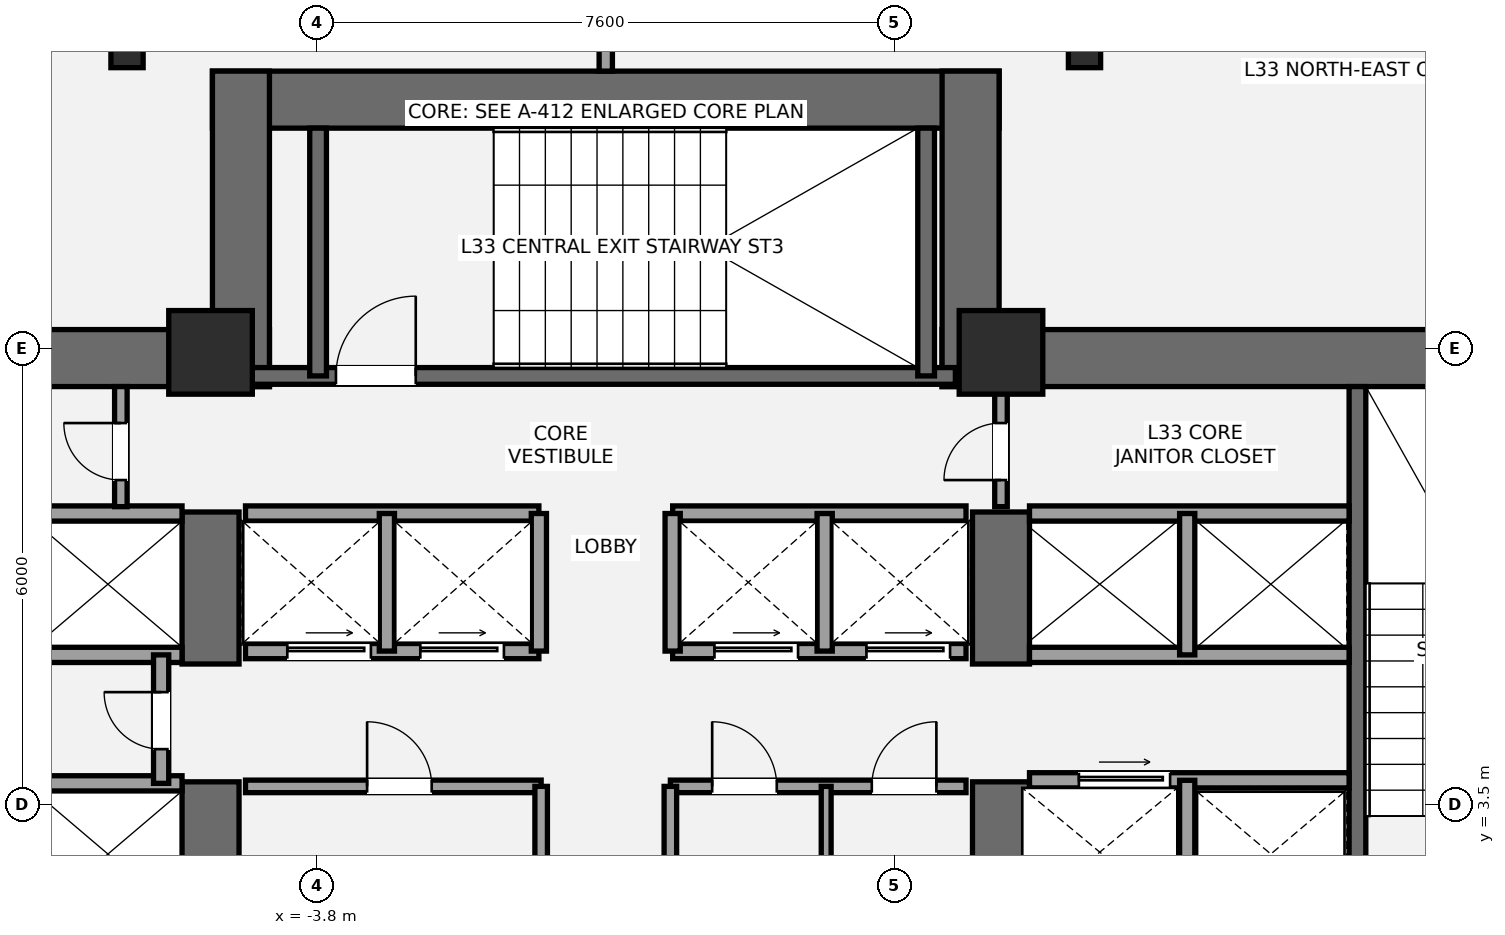
"""IFC4 building model, lengths in metres.
Left out: names, types, materials, properties, quantities, classifications, styles, units other than length and angle.
Written with IfcOpenShell. Run it as: python <this file> out.ifc"""

import sys

from ifc_helpers import new_model, si_unit, direction, frame, frame_2d, origin, origin_2d, place, context, subcontext, project, spatial, rectangle, i_section, extrude, element, fill, save


model = new_model("IFC4")
c1 = context("Model", 3, precision=1e-05, world=origin(), true_north=direction((0.0, 1.0)))
c2 = subcontext(c1, "Body", "Model", "MODEL_VIEW")
j1 = project(units=[si_unit("LENGTHUNIT", "METRE"), si_unit("PLANEANGLEUNIT", "RADIAN")], contexts=[c1])
p1 = place(None, origin())
s1 = spatial("IfcSite", under=j1, at=p1, CompositionType="ELEMENT")
p2 = place(p1, origin())
s2 = spatial("IfcBuilding", under=s1, at=p2, CompositionType="ELEMENT")
p3 = place(p2, frame((0.0, 0.0, 124.6)))
s3 = spatial("IfcBuildingStorey", under=s2, at=p3, CompositionType="ELEMENT", Elevation=124.6)
p4 = place(p3, frame((-13.9, 9.375, 0.0), z_axis=(0.0, 0.0, 1.0), x_axis=(1.0, 0.0, 0.0)))
e1 = element("IfcWall", 1, at=p4, inside=s3, PredefinedType="SHEAR", context=c2, shape_type="SweptSolid", body=[
    extrude(rectangle(XDim=9.475, YDim=0.75, at=frame_2d((4.737, 0.0))), origin(), (0.0, 0.0, 1.0), 3.5),
])
p5 = place(p3, frame((-5.2, 1.1, 0.0), z_axis=(0.0, 0.0, 1.0), x_axis=(0.0, 1.0, 0.0)))
e2 = element("IfcWall", 2, at=p5, inside=s3, PredefinedType="SHEAR", context=c2, shape_type="SweptSolid", body=[
    extrude(rectangle(XDim=2.7, YDim=0.75, at=frame_2d((1.35, 0.0))), origin(), (0.0, 0.0, 1.0), 3.5),
])
p6 = place(p3, frame((-5.2, 5.35, 0.0), z_axis=(0.0, 0.0, 1.0), x_axis=(0.0, 1.0, 0.0)))
e3 = element("IfcWall", 3, at=p6, inside=s3, PredefinedType="SHEAR", context=c2, shape_type="SweptSolid", body=[
    extrude(rectangle(XDim=2.0, YDim=0.75, at=frame_2d((1.0, 0.0))), origin(), (0.0, 0.0, 1.0), 3.5),
])
p7 = place(p3, frame((4.425, 9.375, 0.0), z_axis=(0.0, 0.0, 1.0), x_axis=(1.0, 0.0, 0.0)))
e4 = element("IfcWall", 4, at=p7, inside=s3, PredefinedType="SHEAR", context=c2, shape_type="SweptSolid", body=[
    extrude(rectangle(XDim=9.475, YDim=0.75, at=frame_2d((4.737, 0.0))), origin(), (0.0, 0.0, 1.0), 3.5),
])
p8 = place(p3, frame((5.2, 1.1, 0.0), z_axis=(0.0, 0.0, 1.0), x_axis=(0.0, 1.0, 0.0)))
e5 = element("IfcWall", 5, at=p8, inside=s3, PredefinedType="SHEAR", context=c2, shape_type="SweptSolid", body=[
    extrude(rectangle(XDim=2.7, YDim=0.75, at=frame_2d((1.35, 0.0))), origin(), (0.0, 0.0, 1.0), 3.5),
])
p9 = place(p3, frame((5.2, 5.35, 0.0), z_axis=(0.0, 0.0, 1.0), x_axis=(0.0, 1.0, 0.0)))
e6 = element("IfcWall", 6, at=p9, inside=s3, PredefinedType="SHEAR", context=c2, shape_type="SweptSolid", body=[
    extrude(rectangle(XDim=2.0, YDim=0.75, at=frame_2d((1.0, 0.0))), origin(), (0.0, 0.0, 1.0), 3.5),
])
p10 = place(p3, frame((9.89, 1.85, 0.0), z_axis=(0.0, 0.0, 1.0), x_axis=(0.0, 1.0, 0.0)))
e7 = element("IfcWall", 7, at=p10, inside=s3, PredefinedType="SHEAR", context=c2, shape_type="SweptSolid", body=[
    extrude(rectangle(XDim=7.15, YDim=0.22, at=frame_2d((3.575, 0.0))), origin(), (0.0, 0.0, 1.0), 3.5),
])
p11 = place(p3, frame((-5.175, 12.775, 0.0), z_axis=(0.0, 0.0, 1.0), x_axis=(1.0, 0.0, 0.0)))
e8 = element("IfcWall", 8, at=p11, inside=s3, PredefinedType="SHEAR", context=c2, shape_type="SweptSolid", body=[
    extrude(rectangle(XDim=10.35, YDim=0.75, at=frame_2d((5.175, 0.0))), origin(), (0.0, 0.0, 1.0), 3.5),
])
for number, where, z_axis, x_axis in (
    (9, (-4.8, 9.0, 0.0), (0.0, 0.0, 1.0), (0.0, 1.0, 0.0)),
    (10, (4.8, 9.0, 0.0), (0.0, 0.0, 1.0), (0.0, 1.0, 0.0)),
):
    element("IfcWall", number, at=place(p3, frame(where, z_axis=z_axis, x_axis=x_axis)), inside=s3, PredefinedType="SHEAR", context=c2, shape_type="SweptSolid", body=[
        extrude(rectangle(XDim=4.15, YDim=0.75, at=frame_2d((2.075, 0.0))), origin(), (0.0, 0.0, 1.0), 3.5),
    ])
p12 = place(p3, frame((-4.7, 9.14, 0.0), z_axis=(0.0, 0.0, 1.0), x_axis=(1.0, 0.0, 0.0)))
e11 = element("IfcWall", 11, at=p12, inside=s3, PredefinedType="SHEAR", context=c2, shape_type="SweptSolid", body=[
    extrude(rectangle(XDim=9.3, YDim=0.22, at=frame_2d((4.65, 0.0))), origin(), (0.0, 0.0, 1.0), 3.5),
])
p13 = place(p12, frame((1.15, 0.0, 0.0)))
e12 = element("IfcOpeningElement", 12, at=p13, cuts=e11, PredefinedType="OPENING", context=c2, shape_type="SweptSolid", body=[
    extrude(rectangle(XDim=1.05, YDim=2.15, at=frame_2d((0.525, 1.075))), frame((0.0, 0.12, 0.0), z_axis=(0.0, -1.0, 0.0), x_axis=(1.0, 0.0, 0.0)), (0.0, 0.0, 1.0), 0.24),
])
for number, where, z_axis, x_axis in (
    (13, (-3.785, 9.14, 0.0), (0.0, 0.0, 1.0), (0.0, 1.0, 0.0)),
    (14, (4.215, 9.14, 0.0), (0.0, 0.0, 1.0), (0.0, 1.0, 0.0)),
):
    element("IfcWall", number, at=place(p3, frame(where, z_axis=z_axis, x_axis=x_axis)), inside=s3, PredefinedType="SHEAR", context=c2, shape_type="SweptSolid", body=[
        extrude(rectangle(XDim=3.26, YDim=0.22, at=frame_2d((1.63, 0.0))), origin(), (0.0, 0.0, 1.0), 3.5),
    ])
for number, where, z_axis, x_axis in (
    (15, (-5.2, 9.45, 0.0), (0.0, 0.0, 1.0), (1.0, 0.0, 0.0)),
    (16, (5.2, 9.45, 0.0), (0.0, 0.0, 1.0), (1.0, 0.0, 0.0)),
):
    element("IfcColumn", number, at=place(p3, frame(where, z_axis=z_axis, x_axis=x_axis)), inside=s3, PredefinedType="COLUMN", context=c2, shape_type="SweptSolid", body=[
        extrude(rectangle(XDim=1.1, YDim=1.1, at=origin_2d()), origin(), (0.0, 0.0, 1.0), 3.5),
    ])
for number, where, z_axis, x_axis in (
    (17, (6.299, 13.433, 0.0), (0.0, 0.0, 1.0), (1.0, 0.0, 0.0)),
    (18, (-6.299, 13.433, 0.0), (0.0, 0.0, 1.0), (1.0, 0.0, 0.0)),
):
    element("IfcColumn", number, at=place(p3, frame(where, z_axis=z_axis, x_axis=x_axis)), inside=s3, PredefinedType="COLUMN", context=c2, shape_type="SweptSolid", body=[
        extrude(i_section(OverallWidth=0.424, OverallDepth=0.474, WebThickness=0.048, FlangeThickness=0.077, at=origin_2d()), origin(), (0.0, 0.0, 1.0), 3.5),
    ])
for number, where, z_axis, x_axis in (
    (19, (-9.78, 3.78, 0.0), (0.0, 0.0, 1.0), (1.0, 0.0, 0.0)),
    (20, (-9.78, 5.47, 0.0), (0.0, 0.0, 1.0), (1.0, 0.0, 0.0)),
    (21, (-9.78, 7.33, 0.0), (0.0, 0.0, 1.0), (1.0, 0.0, 0.0)),
):
    element("IfcWall", number, at=place(p3, frame(where, z_axis=z_axis, x_axis=x_axis)), inside=s3, PredefinedType="SOLIDWALL", context=c2, shape_type="SweptSolid", body=[
        extrude(rectangle(XDim=4.205, YDim=0.2, at=frame_2d((2.103, 0.0))), origin(), (0.0, 0.0, 1.0), 3.31),
    ])
p14 = place(p3, frame((-5.85, 3.78, 0.0), z_axis=(0.0, 0.0, 1.0), x_axis=(0.0, 1.0, 0.0)))
e22 = element("IfcWall", 22, at=p14, inside=s3, PredefinedType="SOLIDWALL", context=c2, shape_type="SweptSolid", body=[
    extrude(rectangle(XDim=1.69, YDim=0.2, at=frame_2d((0.845, 0.0))), origin(), (0.0, 0.0, 1.0), 3.31),
])
p15 = place(p14, frame((0.45, 0.0, 0.0)))
e23 = element("IfcOpeningElement", 23, at=p15, cuts=e22, PredefinedType="OPENING", context=c2, shape_type="SweptSolid", body=[
    extrude(rectangle(XDim=0.75, YDim=2.1, at=frame_2d((0.375, 1.05))), frame((0.0, 0.11, 0.0), z_axis=(0.0, -1.0, 0.0), x_axis=(1.0, 0.0, 0.0)), (0.0, 0.0, 1.0), 0.22),
])
p16 = place(p3, frame((5.575, 3.82, 0.0), z_axis=(0.0, 0.0, 1.0), x_axis=(1.0, 0.0, 0.0)))
e24 = element("IfcWall", 24, at=p16, inside=s3, PredefinedType="SOLIDWALL", context=c2, shape_type="SweptSolid", body=[
    extrude(rectangle(XDim=4.205, YDim=0.2, at=frame_2d((2.103, 0.0))), origin(), (0.0, 0.0, 1.0), 3.31),
])
p17 = place(p16, frame((0.65, 0.0, 0.0)))
e25 = element("IfcOpeningElement", 25, at=p17, cuts=e24, PredefinedType="OPENING", context=c2, shape_type="SweptSolid", body=[
    extrude(rectangle(XDim=1.2, YDim=2.2, at=frame_2d((0.6, 1.1))), frame((0.0, 0.11, 0.0), z_axis=(0.0, -1.0, 0.0), x_axis=(1.0, 0.0, 0.0)), (0.0, 0.0, 1.0), 0.22),
])
p18 = place(p3, frame((7.65, 1.85, 0.0), z_axis=(0.0, 0.0, 1.0), x_axis=(0.0, 1.0, 0.0)))
e26 = element("IfcWall", 26, at=p18, inside=s3, PredefinedType="SOLIDWALL", context=c2, shape_type="SweptSolid", body=[
    extrude(rectangle(XDim=1.97, YDim=0.2, at=frame_2d((0.985, 0.0))), origin(), (0.0, 0.0, 1.0), 3.31),
])
for number, where, z_axis, x_axis in (
    (27, (5.575, 5.47, 0.0), (0.0, 0.0, 1.0), (1.0, 0.0, 0.0)),
    (28, (5.575, 7.33, 0.0), (0.0, 0.0, 1.0), (1.0, 0.0, 0.0)),
):
    element("IfcWall", number, at=place(p3, frame(where, z_axis=z_axis, x_axis=x_axis)), inside=s3, PredefinedType="SOLIDWALL", context=c2, shape_type="SweptSolid", body=[
        extrude(rectangle(XDim=4.205, YDim=0.2, at=frame_2d((2.103, 0.0))), origin(), (0.0, 0.0, 1.0), 3.31),
    ])
p19 = place(p3, frame((7.65, 5.47, 0.0), z_axis=(0.0, 0.0, 1.0), x_axis=(0.0, 1.0, 0.0)))
e29 = element("IfcWall", 29, at=p19, inside=s3, PredefinedType="SOLIDWALL", context=c2, shape_type="SweptSolid", body=[
    extrude(rectangle(XDim=1.86, YDim=0.2, at=frame_2d((0.93, 0.0))), origin(), (0.0, 0.0, 1.0), 3.31),
])
p20 = place(p3, frame((-4.74, 3.74, 0.0), z_axis=(0.0, 0.0, 1.0), x_axis=(1.0, 0.0, 0.0)))
e30 = element("IfcWall", 30, at=p20, inside=s3, PredefinedType="PARTITIONING", context=c2, shape_type="SweptSolid", body=[
    extrude(rectangle(XDim=3.89, YDim=0.165, at=frame_2d((1.945, 0.0))), origin(), (0.0, 0.0, 1.0), 3.31),
])
p21 = place(p20, frame((1.6, 0.0, 0.0)))
e31 = element("IfcOpeningElement", 31, at=p21, cuts=e30, PredefinedType="OPENING", context=c2, shape_type="SweptSolid", body=[
    extrude(rectangle(XDim=0.85, YDim=2.1, at=frame_2d((0.425, 1.05))), frame((0.0, 0.093, 0.0), z_axis=(0.0, -1.0, 0.0), x_axis=(1.0, 0.0, 0.0)), (0.0, 0.0, 1.0), 0.185),
])
p22 = place(p3, frame((-0.85, 1.92, 0.0), z_axis=(0.0, 0.0, 1.0), x_axis=(0.0, 1.0, 0.0)))
e32 = element("IfcWall", 32, at=p22, inside=s3, PredefinedType="PARTITIONING", context=c2, shape_type="SweptSolid", body=[
    extrude(rectangle(XDim=1.82, YDim=0.165, at=frame_2d((0.91, 0.0))), origin(), (0.0, 0.0, 1.0), 3.31),
])
p23 = place(p3, frame((0.85, 3.74, 0.0), z_axis=(0.0, 0.0, 1.0), x_axis=(1.0, 0.0, 0.0)))
e33 = element("IfcWall", 33, at=p23, inside=s3, PredefinedType="PARTITIONING", context=c2, shape_type="SweptSolid", body=[
    extrude(rectangle(XDim=3.89, YDim=0.165, at=frame_2d((1.945, 0.0))), origin(), (0.0, 0.0, 1.0), 3.31),
])
p24 = place(p23, frame((0.55, 0.0, 0.0)))
e34 = element("IfcOpeningElement", 34, at=p24, cuts=e33, PredefinedType="OPENING", context=c2, shape_type="SweptSolid", body=[
    extrude(rectangle(XDim=0.85, YDim=2.1, at=frame_2d((0.425, 1.05))), frame((0.0, 0.093, 0.0), z_axis=(0.0, -1.0, 0.0), x_axis=(1.0, 0.0, 0.0)), (0.0, 0.0, 1.0), 0.185),
])
p25 = place(p23, frame((2.65, 0.0, 0.0)))
e35 = element("IfcOpeningElement", 35, at=p25, cuts=e33, PredefinedType="OPENING", context=c2, shape_type="SweptSolid", body=[
    extrude(rectangle(XDim=0.85, YDim=2.1, at=frame_2d((0.425, 1.05))), frame((0.0, 0.093, 0.0), z_axis=(0.0, -1.0, 0.0), x_axis=(1.0, 0.0, 0.0)), (0.0, 0.0, 1.0), 0.185),
])
p26 = place(p3, frame((0.85, 1.92, 0.0), z_axis=(0.0, 0.0, 1.0), x_axis=(0.0, 1.0, 0.0)))
e36 = element("IfcWall", 36, at=p26, inside=s3, PredefinedType="PARTITIONING", context=c2, shape_type="SweptSolid", body=[
    extrude(rectangle(XDim=1.82, YDim=0.165, at=frame_2d((0.91, 0.0))), origin(), (0.0, 0.0, 1.0), 3.31),
])
p27 = place(p3, frame((2.9, 1.92, 0.0), z_axis=(0.0, 0.0, 1.0), x_axis=(0.0, 1.0, 0.0)))
e37 = element("IfcWall", 37, at=p27, inside=s3, PredefinedType="PARTITIONING", context=c2, shape_type="SweptSolid", body=[
    extrude(rectangle(XDim=1.82, YDim=0.13, at=frame_2d((0.91, 0.0))), origin(), (0.0, 0.0, 1.0), 3.31),
])
p28 = place(p3, frame((-4.74, 5.52, 0.0), z_axis=(0.0, 0.0, 1.0), x_axis=(1.0, 0.0, 0.0)))
e38 = element("IfcWall", 38, at=p28, inside=s3, PredefinedType="SOLIDWALL", context=c2, shape_type="SweptSolid", body=[
    extrude(rectangle(XDim=3.86, YDim=0.2, at=frame_2d((1.93, 0.0))), origin(), (0.0, 0.0, 1.0), 3.31),
])
p29 = place(p28, frame((0.55, 0.0, 0.0)))
e39 = element("IfcOpeningElement", 39, at=p29, cuts=e38, PredefinedType="OPENING", context=c2, shape_type="SweptSolid", body=[
    extrude(rectangle(XDim=1.1, YDim=2.2, at=frame_2d((0.55, 1.1))), frame((0.0, 0.11, 0.0), z_axis=(0.0, -1.0, 0.0), x_axis=(1.0, 0.0, 0.0)), (0.0, 0.0, 1.0), 0.22),
])
p30 = place(p28, frame((2.3, 0.0, 0.0)))
e40 = element("IfcOpeningElement", 40, at=p30, cuts=e38, PredefinedType="OPENING", context=c2, shape_type="SweptSolid", body=[
    extrude(rectangle(XDim=1.1, YDim=2.2, at=frame_2d((0.55, 1.1))), frame((0.0, 0.11, 0.0), z_axis=(0.0, -1.0, 0.0), x_axis=(1.0, 0.0, 0.0)), (0.0, 0.0, 1.0), 0.22),
])
p31 = place(p3, frame((0.88, 5.52, 0.0), z_axis=(0.0, 0.0, 1.0), x_axis=(1.0, 0.0, 0.0)))
e41 = element("IfcWall", 41, at=p31, inside=s3, PredefinedType="SOLIDWALL", context=c2, shape_type="SweptSolid", body=[
    extrude(rectangle(XDim=3.86, YDim=0.2, at=frame_2d((1.93, 0.0))), origin(), (0.0, 0.0, 1.0), 3.31),
])
p32 = place(p31, frame((0.55, 0.0, 0.0)))
e42 = element("IfcOpeningElement", 42, at=p32, cuts=e41, PredefinedType="OPENING", context=c2, shape_type="SweptSolid", body=[
    extrude(rectangle(XDim=1.1, YDim=2.2, at=frame_2d((0.55, 1.1))), frame((0.0, 0.11, 0.0), z_axis=(0.0, -1.0, 0.0), x_axis=(1.0, 0.0, 0.0)), (0.0, 0.0, 1.0), 0.22),
])
p33 = place(p31, frame((2.55, 0.0, 0.0)))
e43 = element("IfcOpeningElement", 43, at=p33, cuts=e41, PredefinedType="OPENING", context=c2, shape_type="SweptSolid", body=[
    extrude(rectangle(XDim=1.1, YDim=2.2, at=frame_2d((0.55, 1.1))), frame((0.0, 0.11, 0.0), z_axis=(0.0, -1.0, 0.0), x_axis=(1.0, 0.0, 0.0)), (0.0, 0.0, 1.0), 0.22),
])
for number, where, z_axis, x_axis in (
    (44, (-4.74, 7.33, 0.0), (0.0, 0.0, 1.0), (1.0, 0.0, 0.0)),
    (45, (0.88, 7.33, 0.0), (0.0, 0.0, 1.0), (1.0, 0.0, 0.0)),
):
    element("IfcWall", number, at=place(p3, frame(where, z_axis=z_axis, x_axis=x_axis)), inside=s3, PredefinedType="SOLIDWALL", context=c2, shape_type="SweptSolid", body=[
        extrude(rectangle(XDim=3.86, YDim=0.2, at=frame_2d((1.93, 0.0))), origin(), (0.0, 0.0, 1.0), 3.31),
    ])
for number, where, z_axis, x_axis in (
    (46, (-2.88, 5.52, 0.0), (0.0, 0.0, 1.0), (0.0, 1.0, 0.0)),
    (47, (2.88, 5.52, 0.0), (0.0, 0.0, 1.0), (0.0, 1.0, 0.0)),
    (48, (-0.88, 5.52, 0.0), (0.0, 0.0, 1.0), (0.0, 1.0, 0.0)),
    (49, (0.88, 5.52, 0.0), (0.0, 0.0, 1.0), (0.0, 1.0, 0.0)),
):
    element("IfcWall", number, at=place(p3, frame(where, z_axis=z_axis, x_axis=x_axis)), inside=s3, PredefinedType="SOLIDWALL", context=c2, shape_type="SweptSolid", body=[
        extrude(rectangle(XDim=1.81, YDim=0.2, at=frame_2d((0.905, 0.0))), origin(), (0.0, 0.0, 1.0), 3.31),
    ])
p34 = place(p3, frame((-6.38, 7.42, 0.0), z_axis=(0.0, 0.0, 1.0), x_axis=(0.0, 1.0, 0.0)))
e50 = element("IfcWall", 50, at=p34, inside=s3, PredefinedType="PARTITIONING", context=c2, shape_type="SweptSolid", body=[
    extrude(rectangle(XDim=1.58, YDim=0.165, at=frame_2d((0.79, 0.0))), origin(), (0.0, 0.0, 1.0), 3.31),
])
p35 = place(p34, frame((0.35, 0.0, 0.0)))
e51 = element("IfcOpeningElement", 51, at=p35, cuts=e50, PredefinedType="OPENING", context=c2, shape_type="SweptSolid", body=[
    extrude(rectangle(XDim=0.75, YDim=2.1, at=frame_2d((0.375, 1.05))), frame((0.0, 0.093, 0.0), z_axis=(0.0, -1.0, 0.0), x_axis=(1.0, 0.0, 0.0)), (0.0, 0.0, 1.0), 0.185),
])
p36 = place(p3, frame((5.2, 7.42, 0.0), z_axis=(0.0, 0.0, 1.0), x_axis=(0.0, 1.0, 0.0)))
e52 = element("IfcWall", 52, at=p36, inside=s3, PredefinedType="PARTITIONING", context=c2, shape_type="SweptSolid", body=[
    extrude(rectangle(XDim=1.58, YDim=0.165, at=frame_2d((0.79, 0.0))), origin(), (0.0, 0.0, 1.0), 3.31),
])
p37 = place(p36, frame((0.35, 0.0, 0.0)))
e53 = element("IfcOpeningElement", 53, at=p37, cuts=e52, PredefinedType="OPENING", context=c2, shape_type="SweptSolid", body=[
    extrude(rectangle(XDim=0.75, YDim=2.1, at=frame_2d((0.375, 1.05))), frame((0.0, 0.093, 0.0), z_axis=(0.0, -1.0, 0.0), x_axis=(1.0, 0.0, 0.0)), (0.0, 0.0, 1.0), 0.185),
])
p38 = place(p3, frame((0.0, 13.15, 0.0), z_axis=(0.0, 0.0, 1.0), x_axis=(0.0, 1.0, 0.0)))
e54 = element("IfcWall", 54, at=p38, inside=s3, PredefinedType="PARTITIONING", context=c2, shape_type="SweptSolid", body=[
    extrude(rectangle(XDim=3.979, YDim=0.175, at=frame_2d((1.99, 0.0))), origin(), (0.0, 0.0, 1.0), 3.31),
])
p39 = place(p13, origin())
e55 = element("IfcDoor", 55, at=p39, inside=s3, OperationType="SINGLE_SWING_RIGHT", PredefinedType="DOOR", context=c2, shape_type="SweptSolid", body=[
    extrude(rectangle(XDim=1.05, YDim=2.15, at=frame_2d((0.525, 1.075))), frame((0.0, 0.025, 0.0), z_axis=(0.0, -1.0, 0.0), x_axis=(1.0, 0.0, 0.0)), (0.0, 0.0, 1.0), 0.05),
])
fill(e12, e55)
p40 = place(p15, origin())
e56 = element("IfcDoor", 56, at=p40, inside=s3, OperationType="SINGLE_SWING_RIGHT", PredefinedType="DOOR", context=c2, shape_type="SweptSolid", body=[
    extrude(rectangle(XDim=0.75, YDim=2.1, at=frame_2d((0.375, 1.05))), frame((0.0, 0.025, 0.0), z_axis=(0.0, -1.0, 0.0), x_axis=(1.0, 0.0, 0.0)), (0.0, 0.0, 1.0), 0.05),
])
fill(e23, e56)
p41 = place(p17, origin())
e57 = element("IfcDoor", 57, at=p41, inside=s3, OperationType="SLIDING_TO_RIGHT", PredefinedType="DOOR", context=c2, shape_type="SweptSolid", body=[
    extrude(rectangle(XDim=1.2, YDim=2.2, at=frame_2d((0.6, 1.1))), frame((0.0, 0.025, 0.0), z_axis=(0.0, -1.0, 0.0), x_axis=(1.0, 0.0, 0.0)), (0.0, 0.0, 1.0), 0.05),
])
fill(e25, e57)
p42 = place(p21, origin())
e58 = element("IfcDoor", 58, at=p42, inside=s3, OperationType="SINGLE_SWING_LEFT", PredefinedType="DOOR", context=c2, shape_type="SweptSolid", body=[
    extrude(rectangle(XDim=0.85, YDim=2.1, at=frame_2d((0.425, 1.05))), frame((0.0, 0.025, 0.0), z_axis=(0.0, -1.0, 0.0), x_axis=(1.0, 0.0, 0.0)), (0.0, 0.0, 1.0), 0.05),
])
fill(e31, e58)
p43 = place(p24, origin())
e59 = element("IfcDoor", 59, at=p43, inside=s3, OperationType="SINGLE_SWING_LEFT", PredefinedType="DOOR", context=c2, shape_type="SweptSolid", body=[
    extrude(rectangle(XDim=0.85, YDim=2.1, at=frame_2d((0.425, 1.05))), frame((0.0, 0.025, 0.0), z_axis=(0.0, -1.0, 0.0), x_axis=(1.0, 0.0, 0.0)), (0.0, 0.0, 1.0), 0.05),
])
fill(e34, e59)
p44 = place(p25, origin())
e60 = element("IfcDoor", 60, at=p44, inside=s3, OperationType="SINGLE_SWING_RIGHT", PredefinedType="DOOR", context=c2, shape_type="SweptSolid", body=[
    extrude(rectangle(XDim=0.85, YDim=2.1, at=frame_2d((0.425, 1.05))), frame((0.0, 0.025, 0.0), z_axis=(0.0, -1.0, 0.0), x_axis=(1.0, 0.0, 0.0)), (0.0, 0.0, 1.0), 0.05),
])
fill(e35, e60)
p45 = place(p29, origin())
e61 = element("IfcDoor", 61, at=p45, inside=s3, OperationType="SLIDING_TO_LEFT", PredefinedType="DOOR", context=c2, shape_type="SweptSolid", body=[
    extrude(rectangle(XDim=1.1, YDim=2.2, at=frame_2d((0.55, 1.1))), frame((0.0, 0.025, 0.0), z_axis=(0.0, -1.0, 0.0), x_axis=(1.0, 0.0, 0.0)), (0.0, 0.0, 1.0), 0.05),
])
fill(e39, e61)
p46 = place(p30, origin())
e62 = element("IfcDoor", 62, at=p46, inside=s3, OperationType="SLIDING_TO_LEFT", PredefinedType="DOOR", context=c2, shape_type="SweptSolid", body=[
    extrude(rectangle(XDim=1.1, YDim=2.2, at=frame_2d((0.55, 1.1))), frame((0.0, 0.025, 0.0), z_axis=(0.0, -1.0, 0.0), x_axis=(1.0, 0.0, 0.0)), (0.0, 0.0, 1.0), 0.05),
])
fill(e40, e62)
p47 = place(p32, origin())
e63 = element("IfcDoor", 63, at=p47, inside=s3, OperationType="SLIDING_TO_LEFT", PredefinedType="DOOR", context=c2, shape_type="SweptSolid", body=[
    extrude(rectangle(XDim=1.1, YDim=2.2, at=frame_2d((0.55, 1.1))), frame((0.0, 0.025, 0.0), z_axis=(0.0, -1.0, 0.0), x_axis=(1.0, 0.0, 0.0)), (0.0, 0.0, 1.0), 0.05),
])
fill(e42, e63)
p48 = place(p33, origin())
e64 = element("IfcDoor", 64, at=p48, inside=s3, OperationType="SLIDING_TO_LEFT", PredefinedType="DOOR", context=c2, shape_type="SweptSolid", body=[
    extrude(rectangle(XDim=1.1, YDim=2.2, at=frame_2d((0.55, 1.1))), frame((0.0, 0.025, 0.0), z_axis=(0.0, -1.0, 0.0), x_axis=(1.0, 0.0, 0.0)), (0.0, 0.0, 1.0), 0.05),
])
fill(e43, e64)
p49 = place(p35, origin())
e65 = element("IfcDoor", 65, at=p49, inside=s3, OperationType="SINGLE_SWING_RIGHT", PredefinedType="DOOR", context=c2, shape_type="SweptSolid", body=[
    extrude(rectangle(XDim=0.75, YDim=2.1, at=frame_2d((0.375, 1.05))), frame((0.0, 0.025, 0.0), z_axis=(0.0, -1.0, 0.0), x_axis=(1.0, 0.0, 0.0)), (0.0, 0.0, 1.0), 0.05),
])
fill(e51, e65)
p50 = place(p37, origin())
e66 = element("IfcDoor", 66, at=p50, inside=s3, OperationType="SINGLE_SWING_LEFT", PredefinedType="DOOR", context=c2, shape_type="SweptSolid", body=[
    extrude(rectangle(XDim=0.75, YDim=2.1, at=frame_2d((0.375, 1.05))), frame((0.0, 0.025, 0.0), z_axis=(0.0, -1.0, 0.0), x_axis=(1.0, 0.0, 0.0)), (0.0, 0.0, 1.0), 0.05),
])
fill(e53, e66)
save(model, sys.argv[1])
